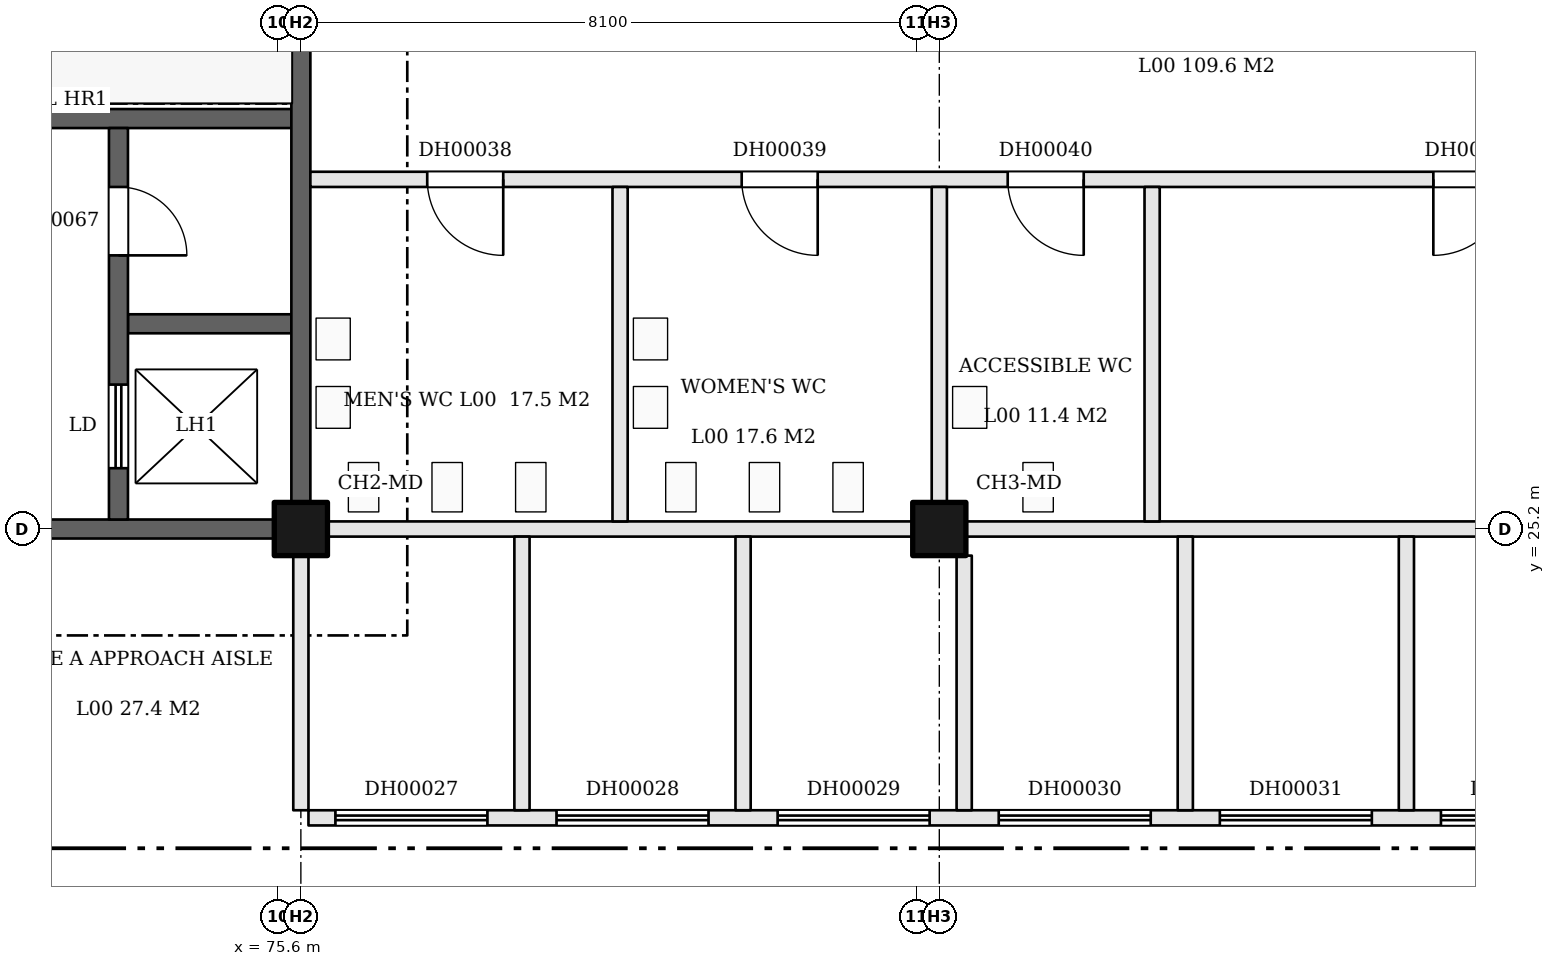
"""IFC4 building model, lengths in metres.
Left out: names, types, materials, properties, quantities, classifications, styles, units other than length and angle.
Written with IfcOpenShell. Run it as: python <this file> out.ifc"""

import sys

from ifc_helpers import new_model, si_unit, direction, frame, frame_2d, origin, origin_2d, place, context, subcontext, project, spatial, rectangle, extrude, element, fill, save


model = new_model("IFC4")
c1 = context("Model", 3, precision=1e-05, world=origin(), true_north=direction((0.0, 1.0)))
c2 = subcontext(c1, "Body", "Model", "MODEL_VIEW")
j1 = project(units=[si_unit("LENGTHUNIT", "METRE"), si_unit("PLANEANGLEUNIT", "RADIAN")], contexts=[c1])
p1 = place(None, origin())
s1 = spatial("IfcSite", under=j1, at=p1, CompositionType="ELEMENT")
p2 = place(p1, origin())
s2 = spatial("IfcBuilding", under=s1, at=p2, CompositionType="ELEMENT")
p3 = place(p2, origin())
s3 = spatial("IfcBuildingStorey", under=s2, at=p3, CompositionType="ELEMENT", Elevation=0.0)
p4 = place(p3, frame((75.9, 25.2, 0.0), z_axis=(0.0, 0.0, 1.0), x_axis=(1.0, 0.0, 0.0)))
e1 = element("IfcColumn", 1, at=p4, inside=s3, PredefinedType="COLUMN", context=c2, shape_type="SweptSolid", body=[
    extrude(rectangle(XDim=0.7, YDim=0.7, at=origin_2d()), origin(), (0.0, 0.0, 1.0), 8.7),
])
p5 = place(p3, frame((84.3, 25.2, -0.2), z_axis=(0.0, 0.0, 1.0), x_axis=(1.0, 0.0, 0.0)))
e2 = element("IfcColumn", 2, at=p5, inside=s3, PredefinedType="COLUMN", context=c2, shape_type="SweptSolid", body=[
    extrude(rectangle(XDim=0.7, YDim=0.7, at=origin_2d()), origin(), (0.0, 0.0, 1.0), 8.9),
])
p6 = place(p3, frame((76.0, 21.4, 0.0), z_axis=(0.0, 0.0, 1.0), x_axis=(1.0, 0.0, 0.0)))
e3 = element("IfcWall", 3, at=p6, inside=s3, PredefinedType="PARTITIONING", context=c2, shape_type="SweptSolid", body=[
    extrude(rectangle(XDim=31.8, YDim=0.2, at=frame_2d((15.9, 0.0))), origin(), (0.0, 0.0, 1.0), 8.7),
])
p7 = place(p6, frame((0.354, 0.0, 0.0)))
e4 = element("IfcOpeningElement", 4, at=p7, cuts=e3, PredefinedType="OPENING", context=c2, shape_type="SweptSolid", body=[
    extrude(rectangle(XDim=2.0, YDim=2.4, at=frame_2d((1.0, 1.2))), frame((0.0, 0.11, 0.0), z_axis=(0.0, -1.0, 0.0), x_axis=(1.0, 0.0, 0.0)), (0.0, 0.0, 1.0), 0.22),
])
p8 = place(p6, frame((3.264, 0.0, 0.0)))
e5 = element("IfcOpeningElement", 5, at=p8, cuts=e3, PredefinedType="OPENING", context=c2, shape_type="SweptSolid", body=[
    extrude(rectangle(XDim=2.0, YDim=2.4, at=frame_2d((1.0, 1.2))), frame((0.0, 0.11, 0.0), z_axis=(0.0, -1.0, 0.0), x_axis=(1.0, 0.0, 0.0)), (0.0, 0.0, 1.0), 0.22),
])
p9 = place(p6, frame((6.173, 0.0, 0.0)))
e6 = element("IfcOpeningElement", 6, at=p9, cuts=e3, PredefinedType="OPENING", context=c2, shape_type="SweptSolid", body=[
    extrude(rectangle(XDim=2.0, YDim=2.4, at=frame_2d((1.0, 1.2))), frame((0.0, 0.11, 0.0), z_axis=(0.0, -1.0, 0.0), x_axis=(1.0, 0.0, 0.0)), (0.0, 0.0, 1.0), 0.22),
])
p10 = place(p6, frame((9.082, 0.0, 0.0)))
e7 = element("IfcOpeningElement", 7, at=p10, cuts=e3, PredefinedType="OPENING", context=c2, shape_type="SweptSolid", body=[
    extrude(rectangle(XDim=2.0, YDim=2.4, at=frame_2d((1.0, 1.2))), frame((0.0, 0.11, 0.0), z_axis=(0.0, -1.0, 0.0), x_axis=(1.0, 0.0, 0.0)), (0.0, 0.0, 1.0), 0.22),
])
p11 = place(p6, frame((11.991, 0.0, 0.0)))
e8 = element("IfcOpeningElement", 8, at=p11, cuts=e3, PredefinedType="OPENING", context=c2, shape_type="SweptSolid", body=[
    extrude(rectangle(XDim=2.0, YDim=2.4, at=frame_2d((1.0, 1.2))), frame((0.0, 0.11, 0.0), z_axis=(0.0, -1.0, 0.0), x_axis=(1.0, 0.0, 0.0)), (0.0, 0.0, 1.0), 0.22),
])
p12 = place(p6, frame((14.9, 0.0, 0.0)))
e9 = element("IfcOpeningElement", 9, at=p12, cuts=e3, PredefinedType="OPENING", context=c2, shape_type="SweptSolid", body=[
    extrude(rectangle(XDim=2.0, YDim=2.4, at=frame_2d((1.0, 1.2))), frame((0.0, 0.11, 0.0), z_axis=(0.0, -1.0, 0.0), x_axis=(1.0, 0.0, 0.0)), (0.0, 0.0, 1.0), 0.22),
])
p13 = place(p6, frame((17.809, 0.0, 0.0)))
e10 = element("IfcOpeningElement", 10, at=p13, cuts=e3, PredefinedType="OPENING", context=c2, shape_type="SweptSolid", body=[
    extrude(rectangle(XDim=2.0, YDim=2.4, at=frame_2d((1.0, 1.2))), frame((0.0, 0.11, 0.0), z_axis=(0.0, -1.0, 0.0), x_axis=(1.0, 0.0, 0.0)), (0.0, 0.0, 1.0), 0.22),
])
p14 = place(p6, frame((20.718, 0.0, 0.0)))
e11 = element("IfcOpeningElement", 11, at=p14, cuts=e3, PredefinedType="OPENING", context=c2, shape_type="SweptSolid", body=[
    extrude(rectangle(XDim=2.0, YDim=2.4, at=frame_2d((1.0, 1.2))), frame((0.0, 0.11, 0.0), z_axis=(0.0, -1.0, 0.0), x_axis=(1.0, 0.0, 0.0)), (0.0, 0.0, 1.0), 0.22),
])
p15 = place(p6, frame((23.627, 0.0, 0.0)))
e12 = element("IfcOpeningElement", 12, at=p15, cuts=e3, PredefinedType="OPENING", context=c2, shape_type="SweptSolid", body=[
    extrude(rectangle(XDim=2.0, YDim=2.4, at=frame_2d((1.0, 1.2))), frame((0.0, 0.11, 0.0), z_axis=(0.0, -1.0, 0.0), x_axis=(1.0, 0.0, 0.0)), (0.0, 0.0, 1.0), 0.22),
])
p16 = place(p6, frame((26.536, 0.0, 0.0)))
e13 = element("IfcOpeningElement", 13, at=p16, cuts=e3, PredefinedType="OPENING", context=c2, shape_type="SweptSolid", body=[
    extrude(rectangle(XDim=2.0, YDim=2.4, at=frame_2d((1.0, 1.2))), frame((0.0, 0.11, 0.0), z_axis=(0.0, -1.0, 0.0), x_axis=(1.0, 0.0, 0.0)), (0.0, 0.0, 1.0), 0.22),
])
p17 = place(p6, frame((29.446, 0.0, 0.0)))
e14 = element("IfcOpeningElement", 14, at=p17, cuts=e3, PredefinedType="OPENING", context=c2, shape_type="SweptSolid", body=[
    extrude(rectangle(XDim=2.0, YDim=2.4, at=frame_2d((1.0, 1.2))), frame((0.0, 0.11, 0.0), z_axis=(0.0, -1.0, 0.0), x_axis=(1.0, 0.0, 0.0)), (0.0, 0.0, 1.0), 0.22),
])
p18 = place(p3, frame((69.05, 25.2, 0.0), z_axis=(0.0, 0.0, 1.0), x_axis=(1.0, 0.0, 0.0)))
e15 = element("IfcWall", 15, at=p18, inside=s3, PredefinedType="SHEAR", context=c2, shape_type="SweptSolid", body=[
    extrude(rectangle(XDim=6.5, YDim=0.25, at=frame_2d((3.25, 0.0))), origin(), (0.0, 0.0, 1.0), 8.7),
])
p19 = place(p18, frame((0.75, 0.0, 0.0)))
e16 = element("IfcOpeningElement", 16, at=p19, cuts=e15, PredefinedType="OPENING", context=c2, shape_type="SweptSolid", body=[
    extrude(rectangle(XDim=1.4, YDim=2.1, at=frame_2d((0.7, 1.05))), frame((0.0, 0.135, 0.0), z_axis=(0.0, -1.0, 0.0), x_axis=(1.0, 0.0, 0.0)), (0.0, 0.0, 1.0), 0.27),
])
p20 = place(p3, frame((76.25, 25.2, 0.0), z_axis=(0.0, 0.0, 1.0), x_axis=(1.0, 0.0, 0.0)))
e17 = element("IfcWall", 17, at=p20, inside=s3, PredefinedType="PARTITIONING", context=c2, shape_type="SweptSolid", body=[
    extrude(rectangle(XDim=7.7, YDim=0.2, at=frame_2d((3.85, 0.0))), origin(), (0.0, 0.0, 1.0), 8.7),
])
p21 = place(p3, frame((84.65, 25.2, 0.0), z_axis=(0.0, 0.0, 1.0), x_axis=(1.0, 0.0, 0.0)))
e18 = element("IfcWall", 18, at=p21, inside=s3, PredefinedType="PARTITIONING", context=c2, shape_type="SweptSolid", body=[
    extrude(rectangle(XDim=7.7, YDim=0.2, at=frame_2d((3.85, 0.0))), origin(), (0.0, 0.0, 1.0), 8.7),
])
p22 = place(p3, frame((73.625, 27.9, 0.0), z_axis=(0.0, 0.0, 1.0), x_axis=(1.0, 0.0, 0.0)))
e19 = element("IfcWall", 19, at=p22, inside=s3, PredefinedType="SHEAR", context=c2, shape_type="SweptSolid", body=[
    extrude(rectangle(XDim=2.15, YDim=0.25, at=frame_2d((1.075, 0.0))), origin(), (0.0, 0.0, 1.0), 8.7),
])
p23 = place(p3, frame((76.025, 29.8, 0.0), z_axis=(0.0, 0.0, 1.0), x_axis=(1.0, 0.0, 0.0)))
e20 = element("IfcWall", 20, at=p23, inside=s3, PredefinedType="PARTITIONING", context=c2, shape_type="SweptSolid", body=[
    extrude(rectangle(XDim=31.775, YDim=0.2, at=frame_2d((15.888, 0.0))), origin(), (0.0, 0.0, 1.0), 8.7),
])
p24 = place(p23, frame((1.538, 0.0, 0.0)))
e21 = element("IfcOpeningElement", 21, at=p24, cuts=e20, PredefinedType="OPENING", context=c2, shape_type="SweptSolid", body=[
    extrude(rectangle(XDim=1.0, YDim=2.1, at=frame_2d((0.5, 1.05))), frame((0.0, 0.11, 0.0), z_axis=(0.0, -1.0, 0.0), x_axis=(1.0, 0.0, 0.0)), (0.0, 0.0, 1.0), 0.22),
])
p25 = place(p23, frame((5.675, 0.0, 0.0)))
e22 = element("IfcOpeningElement", 22, at=p25, cuts=e20, PredefinedType="OPENING", context=c2, shape_type="SweptSolid", body=[
    extrude(rectangle(XDim=1.0, YDim=2.1, at=frame_2d((0.5, 1.05))), frame((0.0, 0.11, 0.0), z_axis=(0.0, -1.0, 0.0), x_axis=(1.0, 0.0, 0.0)), (0.0, 0.0, 1.0), 0.22),
])
p26 = place(p23, frame((9.175, 0.0, 0.0)))
e23 = element("IfcOpeningElement", 23, at=p26, cuts=e20, PredefinedType="OPENING", context=c2, shape_type="SweptSolid", body=[
    extrude(rectangle(XDim=1.0, YDim=2.1, at=frame_2d((0.5, 1.05))), frame((0.0, 0.11, 0.0), z_axis=(0.0, -1.0, 0.0), x_axis=(1.0, 0.0, 0.0)), (0.0, 0.0, 1.0), 0.22),
])
p27 = place(p23, frame((14.775, 0.0, 0.0)))
e24 = element("IfcOpeningElement", 24, at=p27, cuts=e20, PredefinedType="OPENING", context=c2, shape_type="SweptSolid", body=[
    extrude(rectangle(XDim=1.0, YDim=2.1, at=frame_2d((0.5, 1.05))), frame((0.0, 0.11, 0.0), z_axis=(0.0, -1.0, 0.0), x_axis=(1.0, 0.0, 0.0)), (0.0, 0.0, 1.0), 0.22),
])
p28 = place(p23, frame((20.025, 0.0, 0.0)))
e25 = element("IfcOpeningElement", 25, at=p28, cuts=e20, PredefinedType="OPENING", context=c2, shape_type="SweptSolid", body=[
    extrude(rectangle(XDim=2.0, YDim=2.4, at=frame_2d((1.0, 1.2))), frame((0.0, 0.11, 0.0), z_axis=(0.0, -1.0, 0.0), x_axis=(1.0, 0.0, 0.0)), (0.0, 0.0, 1.0), 0.22),
])
p29 = place(p23, frame((23.125, 0.0, 0.0)))
e26 = element("IfcOpeningElement", 26, at=p29, cuts=e20, PredefinedType="OPENING", context=c2, shape_type="SweptSolid", body=[
    extrude(rectangle(XDim=2.0, YDim=2.4, at=frame_2d((1.0, 1.2))), frame((0.0, 0.11, 0.0), z_axis=(0.0, -1.0, 0.0), x_axis=(1.0, 0.0, 0.0)), (0.0, 0.0, 1.0), 0.22),
])
p30 = place(p23, frame((26.225, 0.0, 0.0)))
e27 = element("IfcOpeningElement", 27, at=p30, cuts=e20, PredefinedType="OPENING", context=c2, shape_type="SweptSolid", body=[
    extrude(rectangle(XDim=2.0, YDim=2.4, at=frame_2d((1.0, 1.2))), frame((0.0, 0.11, 0.0), z_axis=(0.0, -1.0, 0.0), x_axis=(1.0, 0.0, 0.0)), (0.0, 0.0, 1.0), 0.22),
])
p31 = place(p23, frame((29.325, 0.0, 0.0)))
e28 = element("IfcOpeningElement", 28, at=p31, cuts=e20, PredefinedType="OPENING", context=c2, shape_type="SweptSolid", body=[
    extrude(rectangle(XDim=2.0, YDim=2.4, at=frame_2d((1.0, 1.2))), frame((0.0, 0.11, 0.0), z_axis=(0.0, -1.0, 0.0), x_axis=(1.0, 0.0, 0.0)), (0.0, 0.0, 1.0), 0.22),
])
p32 = place(p3, frame((67.75, 30.6, 0.0), z_axis=(0.0, 0.0, 1.0), x_axis=(1.0, 0.0, 0.0)))
e29 = element("IfcWall", 29, at=p32, inside=s3, PredefinedType="SHEAR", context=c2, shape_type="SweptSolid", body=[
    extrude(rectangle(XDim=8.025, YDim=0.25, at=frame_2d((4.012, 0.0))), origin(), (0.0, 0.0, 1.0), 8.7),
])
p33 = place(p32, frame((0.2, 0.0, 0.0)))
e30 = element("IfcOpeningElement", 30, at=p33, cuts=e29, PredefinedType="OPENING", context=c2, shape_type="SweptSolid", body=[
    extrude(rectangle(XDim=1.0, YDim=2.1, at=frame_2d((0.5, 1.05))), frame((0.0, 0.135, 0.0), z_axis=(0.0, -1.0, 0.0), x_axis=(1.0, 0.0, 0.0)), (0.0, 0.0, 1.0), 0.27),
])
p34 = place(p3, frame((73.5, 25.325, 0.0), z_axis=(0.0, 0.0, 1.0), x_axis=(0.0, 1.0, 0.0)))
e31 = element("IfcWall", 31, at=p34, inside=s3, PredefinedType="SHEAR", context=c2, shape_type="SweptSolid", body=[
    extrude(rectangle(XDim=5.15, YDim=0.25, at=frame_2d((2.575, 0.0))), origin(), (0.0, 0.0, 1.0), 8.7),
])
p35 = place(p34, frame((0.675, 0.0, 0.0)))
e32 = element("IfcOpeningElement", 32, at=p35, cuts=e31, PredefinedType="OPENING", context=c2, shape_type="SweptSolid", body=[
    extrude(rectangle(XDim=1.1, YDim=2.1, at=frame_2d((0.55, 1.05))), frame((0.0, 0.135, 0.0), z_axis=(0.0, -1.0, 0.0), x_axis=(1.0, 0.0, 0.0)), (0.0, 0.0, 1.0), 0.27),
])
p36 = place(p34, frame((3.475, 0.0, 0.0)))
e33 = element("IfcOpeningElement", 33, at=p36, cuts=e31, PredefinedType="OPENING", context=c2, shape_type="SweptSolid", body=[
    extrude(rectangle(XDim=0.9, YDim=2.1, at=frame_2d((0.45, 1.05))), frame((0.0, 0.135, 0.0), z_axis=(0.0, -1.0, 0.0), x_axis=(1.0, 0.0, 0.0)), (0.0, 0.0, 1.0), 0.27),
])
p37 = place(p3, frame((75.9, 21.5, 0.0), z_axis=(0.0, 0.0, 1.0), x_axis=(0.0, 1.0, 0.0)))
e34 = element("IfcWall", 34, at=p37, inside=s3, PredefinedType="PARTITIONING", context=c2, shape_type="SweptSolid", body=[
    extrude(rectangle(XDim=3.35, YDim=0.2, at=frame_2d((1.675, 0.0))), origin(), (0.0, 0.0, 1.0), 8.7),
])
p38 = place(p3, frame((75.9, 25.55, 0.0), z_axis=(0.0, 0.0, 1.0), x_axis=(0.0, 1.0, 0.0)))
e35 = element("IfcWall", 35, at=p38, inside=s3, PredefinedType="SHEAR", context=c2, shape_type="SweptSolid", body=[
    extrude(rectangle(XDim=7.1, YDim=0.25, at=frame_2d((3.55, 0.0))), origin(), (0.0, 0.0, 1.0), 8.7),
])
p39 = place(p3, frame((78.809, 21.5, 0.0), z_axis=(0.0, 0.0, 1.0), x_axis=(0.0, 1.0, 0.0)))
e36 = element("IfcWall", 36, at=p39, inside=s3, PredefinedType="PARTITIONING", context=c2, shape_type="SweptSolid", body=[
    extrude(rectangle(XDim=3.6, YDim=0.2, at=frame_2d((1.8, 0.0))), origin(), (0.0, 0.0, 1.0), 8.7),
])
p40 = place(p3, frame((80.1, 25.3, 0.0), z_axis=(0.0, 0.0, 1.0), x_axis=(0.0, 1.0, 0.0)))
e37 = element("IfcWall", 37, at=p40, inside=s3, PredefinedType="PARTITIONING", context=c2, shape_type="SweptSolid", body=[
    extrude(rectangle(XDim=4.4, YDim=0.2, at=frame_2d((2.2, 0.0))), origin(), (0.0, 0.0, 1.0), 8.7),
])
p41 = place(p3, frame((81.718, 21.5, 0.0), z_axis=(0.0, 0.0, 1.0), x_axis=(0.0, 1.0, 0.0)))
e38 = element("IfcWall", 38, at=p41, inside=s3, PredefinedType="PARTITIONING", context=c2, shape_type="SweptSolid", body=[
    extrude(rectangle(XDim=3.6, YDim=0.2, at=frame_2d((1.8, 0.0))), origin(), (0.0, 0.0, 1.0), 8.7),
])
p42 = place(p3, frame((84.3, 25.55, 0.0), z_axis=(0.0, 0.0, 1.0), x_axis=(0.0, 1.0, 0.0)))
e39 = element("IfcWall", 39, at=p42, inside=s3, PredefinedType="PARTITIONING", context=c2, shape_type="SweptSolid", body=[
    extrude(rectangle(XDim=4.15, YDim=0.2, at=frame_2d((2.075, 0.0))), origin(), (0.0, 0.0, 1.0), 8.7),
])
p43 = place(p3, frame((84.627, 21.5, 0.0), z_axis=(0.0, 0.0, 1.0), x_axis=(0.0, 1.0, 0.0)))
e40 = element("IfcWall", 40, at=p43, inside=s3, PredefinedType="PARTITIONING", context=c2, shape_type="SweptSolid", body=[
    extrude(rectangle(XDim=3.35, YDim=0.2, at=frame_2d((1.675, 0.0))), origin(), (0.0, 0.0, 1.0), 8.7),
])
p44 = place(p3, frame((87.1, 25.3, 0.0), z_axis=(0.0, 0.0, 1.0), x_axis=(0.0, 1.0, 0.0)))
e41 = element("IfcWall", 41, at=p44, inside=s3, PredefinedType="PARTITIONING", context=c2, shape_type="SweptSolid", body=[
    extrude(rectangle(XDim=4.4, YDim=0.2, at=frame_2d((2.2, 0.0))), origin(), (0.0, 0.0, 1.0), 8.7),
])
for number, where, z_axis, x_axis in (
    (42, (87.536, 21.5, 0.0), (0.0, 0.0, 1.0), (0.0, 1.0, 0.0)),
    (43, (90.446, 21.5, 0.0), (0.0, 0.0, 1.0), (0.0, 1.0, 0.0)),
):
    element("IfcWall", number, at=place(p3, frame(where, z_axis=z_axis, x_axis=x_axis)), inside=s3, PredefinedType="PARTITIONING", context=c2, shape_type="SweptSolid", body=[
        extrude(rectangle(XDim=3.6, YDim=0.2, at=frame_2d((1.8, 0.0))), origin(), (0.0, 0.0, 1.0), 8.7),
    ])
p45 = place(p7, origin())
e44 = element("IfcDoor", 44, at=p45, inside=s3, OperationType="ROLLINGUP", PredefinedType="DOOR", context=c2, shape_type="SweptSolid", body=[
    extrude(rectangle(XDim=2.0, YDim=2.4, at=frame_2d((1.0, 1.2))), frame((0.0, 0.025, 0.0), z_axis=(0.0, -1.0, 0.0), x_axis=(1.0, 0.0, 0.0)), (0.0, 0.0, 1.0), 0.05),
])
fill(e4, e44)
p46 = place(p8, origin())
e45 = element("IfcDoor", 45, at=p46, inside=s3, OperationType="ROLLINGUP", PredefinedType="DOOR", context=c2, shape_type="SweptSolid", body=[
    extrude(rectangle(XDim=2.0, YDim=2.4, at=frame_2d((1.0, 1.2))), frame((0.0, 0.025, 0.0), z_axis=(0.0, -1.0, 0.0), x_axis=(1.0, 0.0, 0.0)), (0.0, 0.0, 1.0), 0.05),
])
fill(e5, e45)
p47 = place(p9, origin())
e46 = element("IfcDoor", 46, at=p47, inside=s3, OperationType="ROLLINGUP", PredefinedType="DOOR", context=c2, shape_type="SweptSolid", body=[
    extrude(rectangle(XDim=2.0, YDim=2.4, at=frame_2d((1.0, 1.2))), frame((0.0, 0.025, 0.0), z_axis=(0.0, -1.0, 0.0), x_axis=(1.0, 0.0, 0.0)), (0.0, 0.0, 1.0), 0.05),
])
fill(e6, e46)
p48 = place(p10, origin())
e47 = element("IfcDoor", 47, at=p48, inside=s3, OperationType="ROLLINGUP", PredefinedType="DOOR", context=c2, shape_type="SweptSolid", body=[
    extrude(rectangle(XDim=2.0, YDim=2.4, at=frame_2d((1.0, 1.2))), frame((0.0, 0.025, 0.0), z_axis=(0.0, -1.0, 0.0), x_axis=(1.0, 0.0, 0.0)), (0.0, 0.0, 1.0), 0.05),
])
fill(e7, e47)
p49 = place(p11, origin())
e48 = element("IfcDoor", 48, at=p49, inside=s3, OperationType="ROLLINGUP", PredefinedType="DOOR", context=c2, shape_type="SweptSolid", body=[
    extrude(rectangle(XDim=2.0, YDim=2.4, at=frame_2d((1.0, 1.2))), frame((0.0, 0.025, 0.0), z_axis=(0.0, -1.0, 0.0), x_axis=(1.0, 0.0, 0.0)), (0.0, 0.0, 1.0), 0.05),
])
fill(e8, e48)
p50 = place(p12, origin())
e49 = element("IfcDoor", 49, at=p50, inside=s3, OperationType="ROLLINGUP", PredefinedType="DOOR", context=c2, shape_type="SweptSolid", body=[
    extrude(rectangle(XDim=2.0, YDim=2.4, at=frame_2d((1.0, 1.2))), frame((0.0, 0.025, 0.0), z_axis=(0.0, -1.0, 0.0), x_axis=(1.0, 0.0, 0.0)), (0.0, 0.0, 1.0), 0.05),
])
fill(e9, e49)
p51 = place(p24, frame((1.0, 0.0, 0.0), z_axis=(0.0, 0.0, 1.0), x_axis=(-1.0, 0.0, 0.0)))
e50 = element("IfcDoor", 50, at=p51, inside=s3, OperationType="SINGLE_SWING_LEFT", PredefinedType="DOOR", context=c2, shape_type="SweptSolid", body=[
    extrude(rectangle(XDim=1.0, YDim=2.1, at=frame_2d((0.5, 1.05))), frame((0.0, 0.025, 0.0), z_axis=(0.0, -1.0, 0.0), x_axis=(1.0, 0.0, 0.0)), (0.0, 0.0, 1.0), 0.05),
])
fill(e21, e50)
p52 = place(p25, frame((1.0, 0.0, 0.0), z_axis=(0.0, 0.0, 1.0), x_axis=(-1.0, 0.0, 0.0)))
e51 = element("IfcDoor", 51, at=p52, inside=s3, OperationType="SINGLE_SWING_LEFT", PredefinedType="DOOR", context=c2, shape_type="SweptSolid", body=[
    extrude(rectangle(XDim=1.0, YDim=2.1, at=frame_2d((0.5, 1.05))), frame((0.0, 0.025, 0.0), z_axis=(0.0, -1.0, 0.0), x_axis=(1.0, 0.0, 0.0)), (0.0, 0.0, 1.0), 0.05),
])
fill(e22, e51)
p53 = place(p26, frame((1.0, 0.0, 0.0), z_axis=(0.0, 0.0, 1.0), x_axis=(-1.0, 0.0, 0.0)))
e52 = element("IfcDoor", 52, at=p53, inside=s3, OperationType="SINGLE_SWING_LEFT", PredefinedType="DOOR", context=c2, shape_type="SweptSolid", body=[
    extrude(rectangle(XDim=1.0, YDim=2.1, at=frame_2d((0.5, 1.05))), frame((0.0, 0.025, 0.0), z_axis=(0.0, -1.0, 0.0), x_axis=(1.0, 0.0, 0.0)), (0.0, 0.0, 1.0), 0.05),
])
fill(e23, e52)
p54 = place(p27, frame((1.0, 0.0, 0.0), z_axis=(0.0, 0.0, 1.0), x_axis=(-1.0, 0.0, 0.0)))
e53 = element("IfcDoor", 53, at=p54, inside=s3, OperationType="SINGLE_SWING_RIGHT", PredefinedType="DOOR", context=c2, shape_type="SweptSolid", body=[
    extrude(rectangle(XDim=1.0, YDim=2.1, at=frame_2d((0.5, 1.05))), frame((0.0, 0.025, 0.0), z_axis=(0.0, -1.0, 0.0), x_axis=(1.0, 0.0, 0.0)), (0.0, 0.0, 1.0), 0.05),
])
fill(e24, e53)
p55 = place(p35, origin())
e54 = element("IfcDoor", 54, at=p55, inside=s3, OperationType="SLIDING_TO_LEFT", PredefinedType="DOOR", context=c2, shape_type="SweptSolid", body=[
    extrude(rectangle(XDim=1.1, YDim=2.1, at=frame_2d((0.55, 1.05))), frame((0.0, 0.025, 0.0), z_axis=(0.0, -1.0, 0.0), x_axis=(1.0, 0.0, 0.0)), (0.0, 0.0, 1.0), 0.05),
])
fill(e32, e54)
p56 = place(p36, frame((0.9, 0.0, 0.0), z_axis=(0.0, 0.0, 1.0), x_axis=(-1.0, 0.0, 0.0)))
e55 = element("IfcDoor", 55, at=p56, inside=s3, OperationType="SINGLE_SWING_RIGHT", PredefinedType="DOOR", context=c2, shape_type="SweptSolid", body=[
    extrude(rectangle(XDim=0.9, YDim=2.1, at=frame_2d((0.45, 1.05))), frame((0.0, 0.025, 0.0), z_axis=(0.0, -1.0, 0.0), x_axis=(1.0, 0.0, 0.0)), (0.0, 0.0, 1.0), 0.05),
])
fill(e33, e55)
save(model, sys.argv[1])
